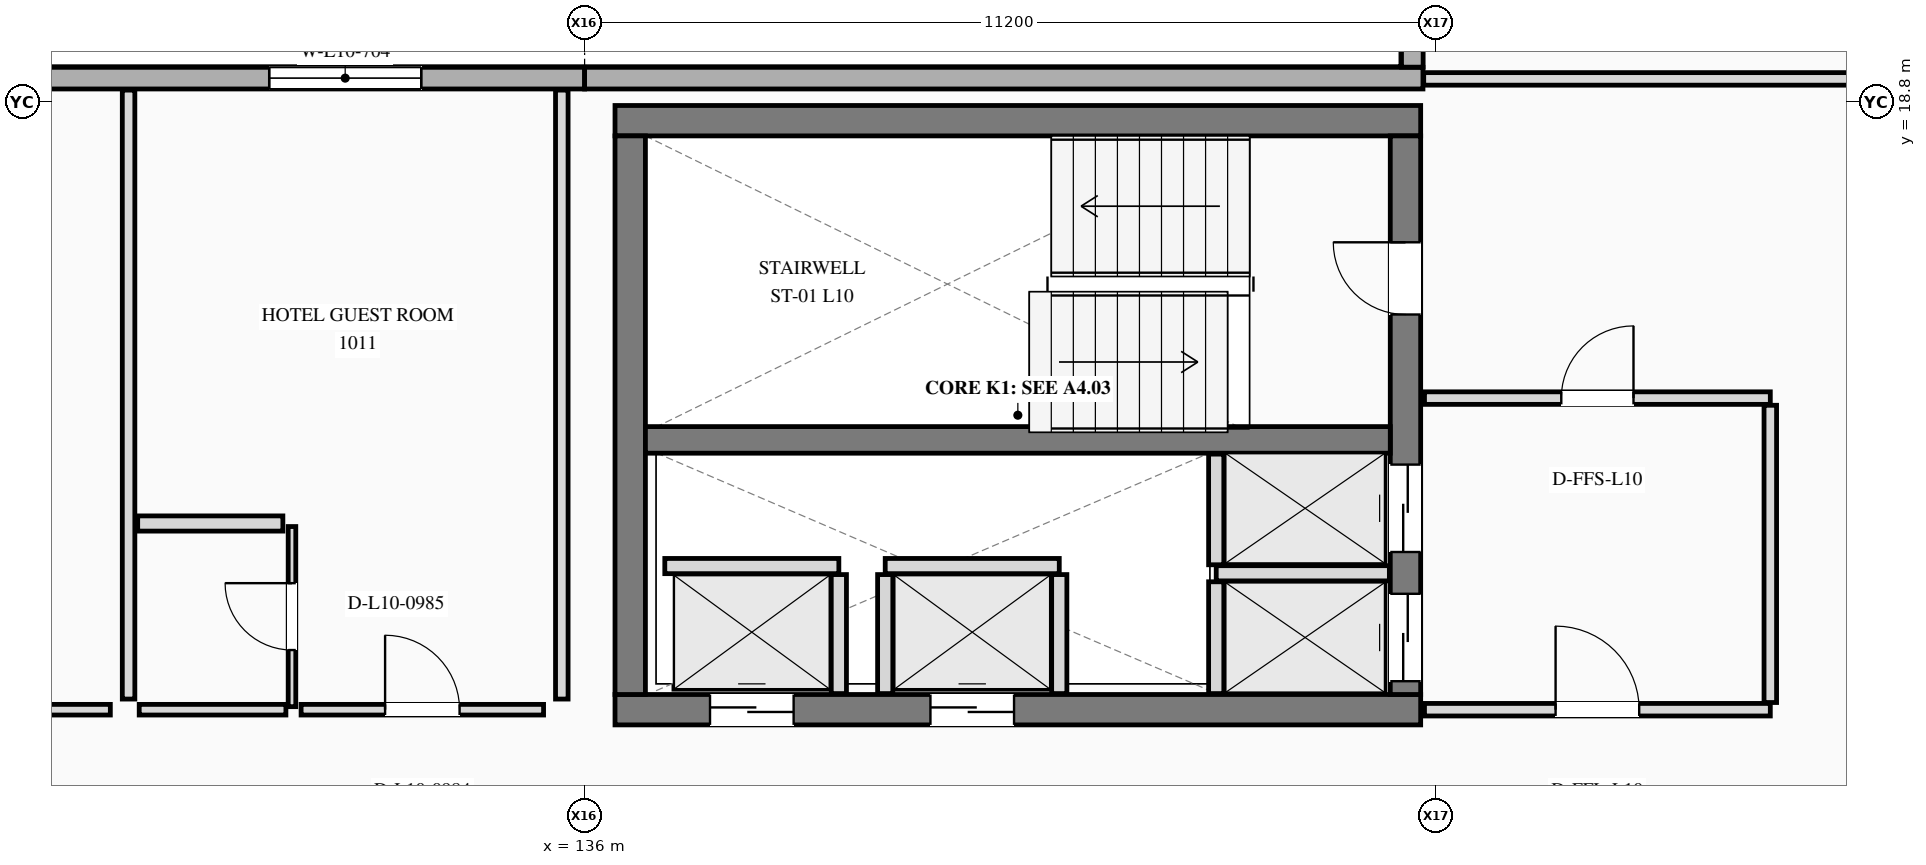
"""IFC4 building model, lengths in metres.
Left out: names, types, materials, properties, quantities, classifications, styles, units other than length and angle.
Written with IfcOpenShell. Run it as: python <this file> out.ifc"""

import sys

from ifc_helpers import new_model, si_unit, direction, frame, frame_2d, origin, place, context, subcontext, project, spatial, rectangle, extrude, element, fill, save


model = new_model("IFC4")
c1 = context("Model", 3, precision=1e-05, world=origin(), true_north=direction((0.0, 1.0)))
c2 = subcontext(c1, "Body", "Model", "MODEL_VIEW")
j1 = project(units=[si_unit("LENGTHUNIT", "METRE"), si_unit("PLANEANGLEUNIT", "RADIAN")], contexts=[c1])
p1 = place(None, origin())
s1 = spatial("IfcSite", under=j1, at=p1, CompositionType="ELEMENT")
p2 = place(p1, origin())
s2 = spatial("IfcBuilding", under=s1, at=p2, CompositionType="ELEMENT")
p3 = place(p2, frame((0.0, 0.0, 41.1)))
s3 = spatial("IfcBuildingStorey", under=s2, at=p3, CompositionType="ELEMENT", Elevation=41.1)
p4 = place(p3, frame((136.0, 19.11, 0.0), z_axis=(0.0, 0.0, 1.0), x_axis=(-1.0, 0.0, 0.0)))
e1 = element("IfcWall", 1, at=p4, inside=s3, PredefinedType="STANDARD", context=c2, shape_type="SweptSolid", body=[
    extrude(rectangle(XDim=12.0, YDim=0.285, at=frame_2d((6.0, 0.0))), origin(), (0.0, 0.0, 1.0), 3.5),
])
p5 = place(p4, frame((7.85, 0.0, 0.85)))
e2 = element("IfcOpeningElement", 2, at=p5, cuts=e1, PredefinedType="OPENING", context=c2, shape_type="SweptSolid", body=[
    extrude(rectangle(XDim=2.0, YDim=1.65, at=frame_2d((1.0, 0.825))), frame((0.0, 0.152, 0.0), z_axis=(0.0, -1.0, 0.0), x_axis=(1.0, 0.0, 0.0)), (0.0, 0.0, 1.0), 0.305),
])
p6 = place(p4, frame((2.15, 0.0, 0.85)))
e3 = element("IfcOpeningElement", 3, at=p6, cuts=e1, PredefinedType="OPENING", context=c2, shape_type="SweptSolid", body=[
    extrude(rectangle(XDim=2.0, YDim=1.65, at=frame_2d((1.0, 0.825))), frame((0.0, 0.152, 0.0), z_axis=(0.0, -1.0, 0.0), x_axis=(1.0, 0.0, 0.0)), (0.0, 0.0, 1.0), 0.305),
])
p7 = place(p3, frame((147.03, 19.11, 0.0), z_axis=(0.0, 0.0, 1.0), x_axis=(-1.0, 0.0, 0.0)))
e4 = element("IfcWall", 4, at=p7, inside=s3, PredefinedType="STANDARD", context=c2, shape_type="SweptSolid", body=[
    extrude(rectangle(XDim=11.03, YDim=0.285, at=frame_2d((5.515, 0.0))), origin(), (0.0, 0.0, 1.0), 3.5),
])
p8 = place(p3, frame((146.89, 19.254, 0.0), z_axis=(0.0, 0.0, 1.0), x_axis=(0.0, 1.0, 0.0)))
e5 = element("IfcWall", 5, at=p8, inside=s3, PredefinedType="STANDARD", context=c2, shape_type="SweptSolid", body=[
    extrude(rectangle(XDim=5.546, YDim=0.285, at=frame_2d((2.773, 0.0))), origin(), (0.0, 0.0, 1.0), 3.5),
])
p9 = place(p8, frame((1.848, 0.0, 0.85)))
e6 = element("IfcOpeningElement", 6, at=p9, cuts=e5, PredefinedType="OPENING", context=c2, shape_type="SweptSolid", body=[
    extrude(rectangle(XDim=1.5, YDim=1.7, at=frame_2d((0.75, 0.85))), frame((0.0, 0.152, 0.0), z_axis=(0.0, -1.0, 0.0), x_axis=(1.0, 0.0, 0.0)), (0.0, 0.0, 1.0), 0.305),
])
p10 = place(p3, frame((136.4, 10.8, 0.0), z_axis=(0.0, 0.0, 1.0), x_axis=(1.0, 0.0, 0.0)))
e7 = element("IfcWall", 7, at=p10, inside=s3, PredefinedType="SHEAR", context=c2, shape_type="SweptSolid", body=[
    extrude(rectangle(XDim=10.6, YDim=0.4, at=frame_2d((5.3, 0.0))), origin(), (0.0, 0.0, 1.0), 3.5),
])
p11 = place(p10, frame((1.25, 0.0, 0.0)))
e8 = element("IfcOpeningElement", 8, at=p11, cuts=e7, PredefinedType="OPENING", context=c2, shape_type="SweptSolid", body=[
    extrude(rectangle(XDim=1.1, YDim=2.2, at=frame_2d((0.55, 1.1))), frame((0.0, 0.21, 0.0), z_axis=(0.0, -1.0, 0.0), x_axis=(1.0, 0.0, 0.0)), (0.0, 0.0, 1.0), 0.42),
])
p12 = place(p10, frame((4.15, 0.0, 0.0)))
e9 = element("IfcOpeningElement", 9, at=p12, cuts=e7, PredefinedType="OPENING", context=c2, shape_type="SweptSolid", body=[
    extrude(rectangle(XDim=1.1, YDim=2.2, at=frame_2d((0.55, 1.1))), frame((0.0, 0.21, 0.0), z_axis=(0.0, -1.0, 0.0), x_axis=(1.0, 0.0, 0.0)), (0.0, 0.0, 1.0), 0.42),
])
p13 = place(p3, frame((147.0, 18.55, 0.0), z_axis=(0.0, 0.0, 1.0), x_axis=(-1.0, 0.0, 0.0)))
e10 = element("IfcWall", 10, at=p13, inside=s3, PredefinedType="SHEAR", context=c2, shape_type="SweptSolid", body=[
    extrude(rectangle(XDim=10.6, YDim=0.4, at=frame_2d((5.3, 0.0))), origin(), (0.0, 0.0, 1.0), 3.5),
])
p14 = place(p3, frame((136.6, 18.35, 0.0), z_axis=(0.0, 0.0, 1.0), x_axis=(0.0, -1.0, 0.0)))
e11 = element("IfcWall", 11, at=p14, inside=s3, PredefinedType="SHEAR", context=c2, shape_type="SweptSolid", body=[
    extrude(rectangle(XDim=7.35, YDim=0.4, at=frame_2d((3.675, 0.0))), origin(), (0.0, 0.0, 1.0), 3.5),
])
p15 = place(p3, frame((146.8, 11.0, 0.0), z_axis=(0.0, 0.0, 1.0), x_axis=(0.0, 1.0, 0.0)))
e12 = element("IfcWall", 12, at=p15, inside=s3, PredefinedType="SHEAR", context=c2, shape_type="SweptSolid", body=[
    extrude(rectangle(XDim=7.35, YDim=0.4, at=frame_2d((3.675, 0.0))), origin(), (0.0, 0.0, 1.0), 3.5),
])
p16 = place(p15, frame((5.0, 0.0, 0.0)))
e13 = element("IfcOpeningElement", 13, at=p16, cuts=e12, PredefinedType="OPENING", context=c2, shape_type="SweptSolid", body=[
    extrude(rectangle(XDim=0.95, YDim=2.2, at=frame_2d((0.475, 1.1))), frame((0.0, 0.21, 0.0), z_axis=(0.0, -1.0, 0.0), x_axis=(1.0, 0.0, 0.0)), (0.0, 0.0, 1.0), 0.42),
])
p17 = place(p15, frame((0.175, 0.0, 0.0)))
e14 = element("IfcOpeningElement", 14, at=p17, cuts=e12, PredefinedType="OPENING", context=c2, shape_type="SweptSolid", body=[
    extrude(rectangle(XDim=1.15, YDim=2.25, at=frame_2d((0.575, 1.125))), frame((0.0, 0.21, 0.0), z_axis=(0.0, -1.0, 0.0), x_axis=(1.0, 0.0, 0.0)), (0.0, 0.0, 1.0), 0.42),
])
p18 = place(p15, frame((1.875, 0.0, 0.0)))
e15 = element("IfcOpeningElement", 15, at=p18, cuts=e12, PredefinedType="OPENING", context=c2, shape_type="SweptSolid", body=[
    extrude(rectangle(XDim=1.15, YDim=2.25, at=frame_2d((0.575, 1.125))), frame((0.0, 0.21, 0.0), z_axis=(0.0, -1.0, 0.0), x_axis=(1.0, 0.0, 0.0)), (0.0, 0.0, 1.0), 0.42),
])
p19 = place(p3, frame((136.8, 14.35, 0.0), z_axis=(0.0, 0.0, 1.0), x_axis=(1.0, 0.0, 0.0)))
e16 = element("IfcWall", 16, at=p19, inside=s3, PredefinedType="SHEAR", context=c2, shape_type="SweptSolid", body=[
    extrude(rectangle(XDim=9.8, YDim=0.35, at=frame_2d((4.9, 0.0))), origin(), (0.0, 0.0, 1.0), 3.5),
])
p20 = place(p3, frame((137.055, 12.69, 0.0), z_axis=(0.0, 0.0, 1.0), x_axis=(1.0, 0.0, 0.0)))
e17 = element("IfcWall", 17, at=p20, inside=s3, PredefinedType="PLUMBINGWALL", context=c2, shape_type="SweptSolid", body=[
    extrude(rectangle(XDim=2.29, YDim=0.2, at=frame_2d((1.145, 0.0))), origin(), (0.0, 0.0, 1.0), 3.18),
])
p21 = place(p3, frame((139.345, 11.012, 0.0), z_axis=(0.0, 0.0, 1.0), x_axis=(0.0, 1.0, 0.0)))
e18 = element("IfcWall", 18, at=p21, inside=s3, PredefinedType="PLUMBINGWALL", context=c2, shape_type="SweptSolid", body=[
    extrude(rectangle(XDim=1.566, YDim=0.2, at=frame_2d((0.783, 0.0))), origin(), (0.0, 0.0, 1.0), 3.18),
])
p22 = place(p3, frame((139.955, 12.69, 0.0), z_axis=(0.0, 0.0, 1.0), x_axis=(1.0, 0.0, 0.0)))
e19 = element("IfcWall", 19, at=p22, inside=s3, PredefinedType="PLUMBINGWALL", context=c2, shape_type="SweptSolid", body=[
    extrude(rectangle(XDim=2.29, YDim=0.2, at=frame_2d((1.145, 0.0))), origin(), (0.0, 0.0, 1.0), 3.18),
])
for number, where, z_axis, x_axis in (
    (20, (139.955, 11.012, 0.0), (0.0, 0.0, 1.0), (0.0, 1.0, 0.0)),
    (21, (142.245, 11.012, 0.0), (0.0, 0.0, 1.0), (0.0, 1.0, 0.0)),
):
    element("IfcWall", number, at=place(p3, frame(where, z_axis=z_axis, x_axis=x_axis)), inside=s3, PredefinedType="PLUMBINGWALL", context=c2, shape_type="SweptSolid", body=[
        extrude(rectangle(XDim=1.566, YDim=0.2, at=frame_2d((0.783, 0.0))), origin(), (0.0, 0.0, 1.0), 3.18),
    ])
p23 = place(p3, frame((144.31, 12.595, 0.0), z_axis=(0.0, 0.0, 1.0), x_axis=(1.0, 0.0, 0.0)))
e22 = element("IfcWall", 22, at=p23, inside=s3, PredefinedType="PLUMBINGWALL", context=c2, shape_type="SweptSolid", body=[
    extrude(rectangle(XDim=2.278, YDim=0.2, at=frame_2d((1.139, 0.0))), origin(), (0.0, 0.0, 1.0), 3.18),
])
p24 = place(p3, frame((144.31, 11.012, 0.0), z_axis=(0.0, 0.0, 1.0), x_axis=(0.0, 1.0, 0.0)))
e23 = element("IfcWall", 23, at=p24, inside=s3, PredefinedType="PLUMBINGWALL", context=c2, shape_type="SweptSolid", body=[
    extrude(rectangle(XDim=1.471, YDim=0.2, at=frame_2d((0.735, 0.0))), origin(), (0.0, 0.0, 1.0), 3.18),
])
p25 = place(p3, frame((144.31, 12.707, 0.0), z_axis=(0.0, 0.0, 1.0), x_axis=(0.0, 1.0, 0.0)))
e24 = element("IfcWall", 24, at=p25, inside=s3, PredefinedType="PLUMBINGWALL", context=c2, shape_type="SweptSolid", body=[
    extrude(rectangle(XDim=1.456, YDim=0.2, at=frame_2d((0.728, 0.0))), origin(), (0.0, 0.0, 1.0), 3.18),
])
p26 = place(p3, frame((147.05, 10.8, 0.0), z_axis=(0.0, 0.0, 1.0), x_axis=(1.0, 0.0, 0.0)))
e25 = element("IfcWall", 25, at=p26, inside=s3, PredefinedType="PARTITIONING", context=c2, shape_type="SweptSolid", body=[
    extrude(rectangle(XDim=4.55, YDim=0.165, at=frame_2d((2.275, 0.0))), origin(), (0.0, 0.0, 1.0), 3.18),
])
p27 = place(p26, frame((1.725, 0.0, 0.0)))
e26 = element("IfcOpeningElement", 26, at=p27, cuts=e25, PredefinedType="OPENING", context=c2, shape_type="SweptSolid", body=[
    extrude(rectangle(XDim=1.1, YDim=2.2, at=frame_2d((0.55, 1.1))), frame((0.0, 0.093, 0.0), z_axis=(0.0, -1.0, 0.0), x_axis=(1.0, 0.0, 0.0)), (0.0, 0.0, 1.0), 0.185),
])
p28 = place(p3, frame((147.05, 14.9, 0.0), z_axis=(0.0, 0.0, 1.0), x_axis=(1.0, 0.0, 0.0)))
e27 = element("IfcWall", 27, at=p28, inside=s3, PredefinedType="PARTITIONING", context=c2, shape_type="SweptSolid", body=[
    extrude(rectangle(XDim=4.55, YDim=0.165, at=frame_2d((2.275, 0.0))), origin(), (0.0, 0.0, 1.0), 3.18),
])
p29 = place(p28, frame((1.8, 0.0, 0.0)))
e28 = element("IfcOpeningElement", 28, at=p29, cuts=e27, PredefinedType="OPENING", context=c2, shape_type="SweptSolid", body=[
    extrude(rectangle(XDim=0.95, YDim=2.2, at=frame_2d((0.475, 1.1))), frame((0.0, 0.093, 0.0), z_axis=(0.0, -1.0, 0.0), x_axis=(1.0, 0.0, 0.0)), (0.0, 0.0, 1.0), 0.185),
])
p30 = place(p3, frame((151.6, 10.895, 0.0), z_axis=(0.0, 0.0, 1.0), x_axis=(0.0, 1.0, 0.0)))
e29 = element("IfcWall", 29, at=p30, inside=s3, PredefinedType="PARTITIONING", context=c2, shape_type="SweptSolid", body=[
    extrude(rectangle(XDim=3.911, YDim=0.165, at=frame_2d((1.956, 0.0))), origin(), (0.0, 0.0, 1.0), 3.18),
])
p31 = place(p3, frame((126.57, 10.8, 0.0), z_axis=(0.0, 0.0, 1.0), x_axis=(1.0, 0.0, 0.0)))
e30 = element("IfcWall", 30, at=p31, inside=s3, PredefinedType="PARTITIONING", context=c2, shape_type="SweptSolid", body=[
    extrude(rectangle(XDim=3.19, YDim=0.14, at=frame_2d((1.595, 0.0))), origin(), (0.0, 0.0, 1.0), 3.18),
])
p32 = place(p31, frame((1.12, 0.0, 0.0)))
e31 = element("IfcOpeningElement", 31, at=p32, cuts=e30, PredefinedType="OPENING", context=c2, shape_type="SweptSolid", body=[
    extrude(rectangle(XDim=0.95, YDim=2.3, at=frame_2d((0.475, 1.15))), frame((0.0, 0.08, 0.0), z_axis=(0.0, -1.0, 0.0), x_axis=(1.0, 0.0, 0.0)), (0.0, 0.0, 1.0), 0.16),
])
p33 = place(p3, frame((130.0, 10.94, 0.0), z_axis=(0.0, 0.0, 1.0), x_axis=(0.0, 1.0, 0.0)))
e32 = element("IfcWall", 32, at=p33, inside=s3, PredefinedType="PARTITIONING", context=c2, shape_type="SweptSolid", body=[
    extrude(rectangle(XDim=8.012, YDim=0.165, at=frame_2d((4.006, 0.0))), origin(), (0.0, 0.0, 1.0), 3.18),
])
p34 = place(p3, frame((130.14, 10.8, 0.0), z_axis=(0.0, 0.0, 1.0), x_axis=(1.0, 0.0, 0.0)))
e33 = element("IfcWall", 33, at=p34, inside=s3, PredefinedType="PARTITIONING", context=c2, shape_type="SweptSolid", body=[
    extrude(rectangle(XDim=1.93, YDim=0.14, at=frame_2d((0.965, 0.0))), origin(), (0.0, 0.0, 1.0), 3.18),
])
p35 = place(p3, frame((132.27, 10.8, 0.0), z_axis=(0.0, 0.0, 1.0), x_axis=(1.0, 0.0, 0.0)))
e34 = element("IfcWall", 34, at=p35, inside=s3, PredefinedType="PARTITIONING", context=c2, shape_type="SweptSolid", body=[
    extrude(rectangle(XDim=3.19, YDim=0.14, at=frame_2d((1.595, 0.0))), origin(), (0.0, 0.0, 1.0), 3.18),
])
p36 = place(p35, frame((1.105, 0.0, 0.0)))
e35 = element("IfcOpeningElement", 35, at=p36, cuts=e34, PredefinedType="OPENING", context=c2, shape_type="SweptSolid", body=[
    extrude(rectangle(XDim=0.98, YDim=2.35, at=frame_2d((0.49, 1.175))), frame((0.0, 0.08, 0.0), z_axis=(0.0, -1.0, 0.0), x_axis=(1.0, 0.0, 0.0)), (0.0, 0.0, 1.0), 0.16),
])
p37 = place(p3, frame((135.7, 10.94, 0.0), z_axis=(0.0, 0.0, 1.0), x_axis=(0.0, 1.0, 0.0)))
e36 = element("IfcWall", 36, at=p37, inside=s3, PredefinedType="PARTITIONING", context=c2, shape_type="SweptSolid", body=[
    extrude(rectangle(XDim=8.012, YDim=0.165, at=frame_2d((4.006, 0.0))), origin(), (0.0, 0.0, 1.0), 3.18),
])
p38 = place(p3, frame((132.15, 10.84, 0.0), z_axis=(0.0, 0.0, 1.0), x_axis=(0.0, 1.0, 0.0)))
e37 = element("IfcWall", 37, at=p38, inside=s3, PredefinedType="PARTITIONING", context=c2, shape_type="SweptSolid", body=[
    extrude(rectangle(XDim=2.37, YDim=0.1, at=frame_2d((1.185, 0.0))), origin(), (0.0, 0.0, 1.0), 3.18),
])
p39 = place(p38, frame((0.745, 0.0, 0.0)))
e38 = element("IfcOpeningElement", 38, at=p39, cuts=e37, PredefinedType="OPENING", context=c2, shape_type="SweptSolid", body=[
    extrude(rectangle(XDim=0.88, YDim=2.18, at=frame_2d((0.44, 1.09))), frame((0.0, 0.06, 0.0), z_axis=(0.0, -1.0, 0.0), x_axis=(1.0, 0.0, 0.0)), (0.0, 0.0, 1.0), 0.12),
])
p40 = place(p3, frame((130.12, 13.25, 0.0), z_axis=(0.0, 0.0, 1.0), x_axis=(1.0, 0.0, 0.0)))
e39 = element("IfcWall", 39, at=p40, inside=s3, PredefinedType="PLUMBINGWALL", context=c2, shape_type="SweptSolid", body=[
    extrude(rectangle(XDim=1.91, YDim=0.2, at=frame_2d((0.955, 0.0))), origin(), (0.0, 0.0, 1.0), 3.18),
])
p41 = place(p3, frame((147.04, 19.1, 0.0), z_axis=(0.0, 0.0, 1.0), x_axis=(1.0, 0.0, 0.0)))
e40 = element("IfcWall", 40, at=p41, inside=s3, PredefinedType="PARTITIONING", context=c2, shape_type="SweptSolid", body=[
    extrude(rectangle(XDim=8.22, YDim=0.165, at=frame_2d((4.11, 0.0))), origin(), (0.0, 0.0, 1.0), 3.18),
])
p42 = place(p6, origin())
e41 = element("IfcWindow", 41, at=p42, inside=s3, PartitioningType="SINGLE_PANEL", PredefinedType="WINDOW", context=c2, shape_type="SweptSolid", body=[
    extrude(rectangle(XDim=2.0, YDim=1.65, at=frame_2d((1.0, 0.825))), frame((0.0, 0.03, 0.0), z_axis=(0.0, -1.0, 0.0), x_axis=(1.0, 0.0, 0.0)), (0.0, 0.0, 1.0), 0.06),
])
fill(e3, e41)
p43 = place(p16, origin())
e42 = element("IfcDoor", 42, at=p43, inside=s3, OperationType="SINGLE_SWING_RIGHT", PredefinedType="DOOR", context=c2, shape_type="SweptSolid", body=[
    extrude(rectangle(XDim=0.95, YDim=2.2, at=frame_2d((0.475, 1.1))), frame((0.0, 0.025, 0.0), z_axis=(0.0, -1.0, 0.0), x_axis=(1.0, 0.0, 0.0)), (0.0, 0.0, 1.0), 0.05),
])
fill(e13, e42)
p44 = place(p11, origin())
e43 = element("IfcDoor", 43, at=p44, inside=s3, OperationType="SLIDING_TO_LEFT", PredefinedType="DOOR", context=c2, shape_type="SweptSolid", body=[
    extrude(rectangle(XDim=1.1, YDim=2.2, at=frame_2d((0.55, 1.1))), frame((0.0, 0.025, 0.0), z_axis=(0.0, -1.0, 0.0), x_axis=(1.0, 0.0, 0.0)), (0.0, 0.0, 1.0), 0.05),
])
fill(e8, e43)
p45 = place(p12, origin())
e44 = element("IfcDoor", 44, at=p45, inside=s3, OperationType="SLIDING_TO_RIGHT", PredefinedType="DOOR", context=c2, shape_type="SweptSolid", body=[
    extrude(rectangle(XDim=1.1, YDim=2.2, at=frame_2d((0.55, 1.1))), frame((0.0, 0.025, 0.0), z_axis=(0.0, -1.0, 0.0), x_axis=(1.0, 0.0, 0.0)), (0.0, 0.0, 1.0), 0.05),
])
fill(e9, e44)
p46 = place(p17, origin())
e45 = element("IfcDoor", 45, at=p46, inside=s3, OperationType="SLIDING_TO_LEFT", PredefinedType="DOOR", context=c2, shape_type="SweptSolid", body=[
    extrude(rectangle(XDim=1.15, YDim=2.25, at=frame_2d((0.575, 1.125))), frame((0.0, 0.025, 0.0), z_axis=(0.0, -1.0, 0.0), x_axis=(1.0, 0.0, 0.0)), (0.0, 0.0, 1.0), 0.05),
])
fill(e14, e45)
p47 = place(p18, origin())
e46 = element("IfcDoor", 46, at=p47, inside=s3, OperationType="SLIDING_TO_RIGHT", PredefinedType="DOOR", context=c2, shape_type="SweptSolid", body=[
    extrude(rectangle(XDim=1.15, YDim=2.25, at=frame_2d((0.575, 1.125))), frame((0.0, 0.025, 0.0), z_axis=(0.0, -1.0, 0.0), x_axis=(1.0, 0.0, 0.0)), (0.0, 0.0, 1.0), 0.05),
])
fill(e15, e46)
p48 = place(p27, origin())
e47 = element("IfcDoor", 47, at=p48, inside=s3, OperationType="SINGLE_SWING_LEFT", PredefinedType="DOOR", context=c2, shape_type="SweptSolid", body=[
    extrude(rectangle(XDim=1.1, YDim=2.2, at=frame_2d((0.55, 1.1))), frame((0.0, 0.025, 0.0), z_axis=(0.0, -1.0, 0.0), x_axis=(1.0, 0.0, 0.0)), (0.0, 0.0, 1.0), 0.05),
])
fill(e26, e47)
p49 = place(p29, origin())
e48 = element("IfcDoor", 48, at=p49, inside=s3, OperationType="SINGLE_SWING_RIGHT", PredefinedType="DOOR", context=c2, shape_type="SweptSolid", body=[
    extrude(rectangle(XDim=0.95, YDim=2.2, at=frame_2d((0.475, 1.1))), frame((0.0, 0.025, 0.0), z_axis=(0.0, -1.0, 0.0), x_axis=(1.0, 0.0, 0.0)), (0.0, 0.0, 1.0), 0.05),
])
fill(e28, e48)
p50 = place(p36, origin())
e49 = element("IfcDoor", 49, at=p50, inside=s3, OperationType="SINGLE_SWING_LEFT", PredefinedType="DOOR", context=c2, shape_type="SweptSolid", body=[
    extrude(rectangle(XDim=0.98, YDim=2.35, at=frame_2d((0.49, 1.175))), frame((0.0, 0.025, 0.0), z_axis=(0.0, -1.0, 0.0), x_axis=(1.0, 0.0, 0.0)), (0.0, 0.0, 1.0), 0.05),
])
fill(e35, e49)
p51 = place(p39, origin())
e50 = element("IfcDoor", 50, at=p51, inside=s3, OperationType="SINGLE_SWING_RIGHT", PredefinedType="DOOR", context=c2, shape_type="SweptSolid", body=[
    extrude(rectangle(XDim=0.88, YDim=2.18, at=frame_2d((0.44, 1.09))), frame((0.0, 0.025, 0.0), z_axis=(0.0, -1.0, 0.0), x_axis=(1.0, 0.0, 0.0)), (0.0, 0.0, 1.0), 0.05),
])
fill(e38, e50)
save(model, sys.argv[1])
